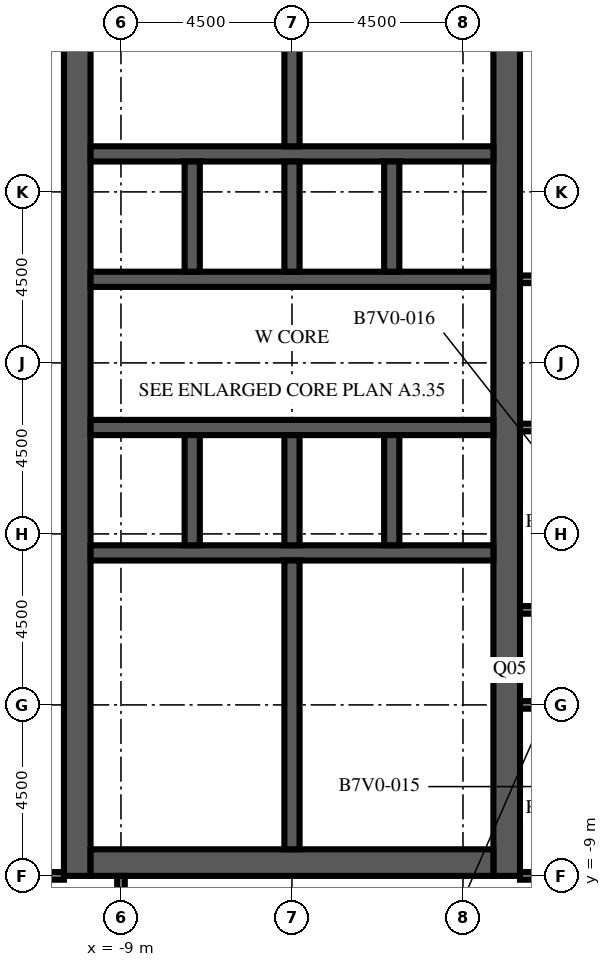
"""IFC4 building model, lengths in metres.
Left out: names, types, materials, properties, quantities, classifications, styles, units other than length and angle.
Written with IfcOpenShell. Run it as: python <this file> out.ifc"""

import sys

from ifc_helpers import new_model, si_unit, direction, frame, frame_2d, origin, place, context, subcontext, project, spatial, rectangle, extrude, element, fill, save


model = new_model("IFC4")
c1 = context("Model", 3, precision=1e-05, world=origin(), true_north=direction((0.0, 1.0)))
c2 = subcontext(c1, "Body", "Model", "MODEL_VIEW")
j1 = project(units=[si_unit("LENGTHUNIT", "METRE"), si_unit("PLANEANGLEUNIT", "RADIAN")], contexts=[c1])
p1 = place(None, origin())
s1 = spatial("IfcSite", under=j1, at=p1, CompositionType="ELEMENT")
p2 = place(p1, origin())
s2 = spatial("IfcBuilding", under=s1, at=p2, CompositionType="ELEMENT")
p3 = place(p2, frame((0.0, 0.0, 235.7)))
s3 = spatial("IfcBuildingStorey", under=s2, at=p3, CompositionType="ELEMENT", Elevation=235.7)
p4 = place(p3, frame((-10.15, -9.0, 0.0), z_axis=(0.0, 0.0, 1.0), x_axis=(0.0, 1.0, 0.0)))
e1 = element("IfcWall", 1, at=p4, inside=s3, PredefinedType="SHEAR", context=c2, shape_type="SweptSolid", body=[
    extrude(rectangle(XDim=27.5, YDim=0.7, at=frame_2d((13.75, 0.0))), origin(), (0.0, 0.0, 1.0), 4.1),
])
p5 = place(p4, frame((12.55, 0.0, 0.0)))
e2 = element("IfcOpeningElement", 2, at=p5, cuts=e1, PredefinedType="OPENING", context=c2, shape_type="SweptSolid", body=[
    extrude(rectangle(XDim=2.4, YDim=2.4, at=frame_2d((1.2, 1.2))), frame((0.0, 0.36, 0.0), z_axis=(0.0, -1.0, 0.0), x_axis=(1.0, 0.0, 0.0)), (0.0, 0.0, 1.0), 0.72),
])
p6 = place(p4, frame((6.825, 0.0, 0.0)))
e3 = element("IfcOpeningElement", 3, at=p6, cuts=e1, PredefinedType="OPENING", context=c2, shape_type="SweptSolid", body=[
    extrude(rectangle(XDim=1.2, YDim=2.1, at=frame_2d((0.6, 1.05))), frame((0.0, 0.36, 0.0), z_axis=(0.0, -1.0, 0.0), x_axis=(1.0, 0.0, 0.0)), (0.0, 0.0, 1.0), 0.72),
])
p7 = place(p4, frame((19.475, 0.0, 0.0)))
e4 = element("IfcOpeningElement", 4, at=p7, cuts=e1, PredefinedType="OPENING", context=c2, shape_type="SweptSolid", body=[
    extrude(rectangle(XDim=1.2, YDim=2.1, at=frame_2d((0.6, 1.05))), frame((0.0, 0.36, 0.0), z_axis=(0.0, -1.0, 0.0), x_axis=(1.0, 0.0, 0.0)), (0.0, 0.0, 1.0), 0.72),
])
p8 = place(p3, frame((1.15, -9.0, 0.0), z_axis=(0.0, 0.0, 1.0), x_axis=(0.0, 1.0, 0.0)))
e5 = element("IfcWall", 5, at=p8, inside=s3, PredefinedType="SHEAR", context=c2, shape_type="SweptSolid", body=[
    extrude(rectangle(XDim=27.5, YDim=0.7, at=frame_2d((13.75, 0.0))), origin(), (0.0, 0.0, 1.0), 4.1),
])
p9 = place(p8, frame((12.55, 0.0, 0.0)))
e6 = element("IfcOpeningElement", 6, at=p9, cuts=e5, PredefinedType="OPENING", context=c2, shape_type="SweptSolid", body=[
    extrude(rectangle(XDim=2.4, YDim=2.4, at=frame_2d((1.2, 1.2))), frame((0.0, 0.36, 0.0), z_axis=(0.0, -1.0, 0.0), x_axis=(1.0, 0.0, 0.0)), (0.0, 0.0, 1.0), 0.72),
])
p10 = place(p8, frame((5.42, 0.0, 0.0)))
e7 = element("IfcOpeningElement", 7, at=p10, cuts=e5, PredefinedType="OPENING", context=c2, shape_type="SweptSolid", body=[
    extrude(rectangle(XDim=1.2, YDim=2.1, at=frame_2d((0.6, 1.05))), frame((0.0, 0.36, 0.0), z_axis=(0.0, -1.0, 0.0), x_axis=(1.0, 0.0, 0.0)), (0.0, 0.0, 1.0), 0.72),
])
p11 = place(p8, frame((19.46, 0.0, 0.0)))
e8 = element("IfcOpeningElement", 8, at=p11, cuts=e5, PredefinedType="OPENING", context=c2, shape_type="SweptSolid", body=[
    extrude(rectangle(XDim=1.0, YDim=2.1, at=frame_2d((0.5, 1.05))), frame((0.0, 0.36, 0.0), z_axis=(0.0, -1.0, 0.0), x_axis=(1.0, 0.0, 0.0)), (0.0, 0.0, 1.0), 0.72),
])
p12 = place(p8, frame((21.17, 0.0, 0.0)))
e9 = element("IfcOpeningElement", 9, at=p12, cuts=e5, PredefinedType="OPENING", context=c2, shape_type="SweptSolid", body=[
    extrude(rectangle(XDim=1.0, YDim=2.1, at=frame_2d((0.5, 1.05))), frame((0.0, 0.36, 0.0), z_axis=(0.0, -1.0, 0.0), x_axis=(1.0, 0.0, 0.0)), (0.0, 0.0, 1.0), 0.72),
])
p13 = place(p8, frame((23.26, 0.0, 0.0)))
e10 = element("IfcOpeningElement", 10, at=p13, cuts=e5, PredefinedType="OPENING", context=c2, shape_type="SweptSolid", body=[
    extrude(rectangle(XDim=1.0, YDim=2.1, at=frame_2d((0.5, 1.05))), frame((0.0, 0.36, 0.0), z_axis=(0.0, -1.0, 0.0), x_axis=(1.0, 0.0, 0.0)), (0.0, 0.0, 1.0), 0.72),
])
p14 = place(p8, frame((25.35, 0.0, 0.0)))
e11 = element("IfcOpeningElement", 11, at=p14, cuts=e5, PredefinedType="OPENING", context=c2, shape_type="SweptSolid", body=[
    extrude(rectangle(XDim=1.0, YDim=2.1, at=frame_2d((0.5, 1.05))), frame((0.0, 0.36, 0.0), z_axis=(0.0, -1.0, 0.0), x_axis=(1.0, 0.0, 0.0)), (0.0, 0.0, 1.0), 0.72),
])
p15 = place(p3, frame((-9.8, -8.65, 0.0), z_axis=(0.0, 0.0, 1.0), x_axis=(1.0, 0.0, 0.0)))
e12 = element("IfcWall", 12, at=p15, inside=s3, PredefinedType="SHEAR", context=c2, shape_type="SweptSolid", body=[
    extrude(rectangle(XDim=10.6, YDim=0.7, at=frame_2d((5.3, 0.0))), origin(), (0.0, 0.0, 1.0), 4.1),
])
p16 = place(p3, frame((-9.8, -0.5, 0.0), z_axis=(0.0, 0.0, 1.0), x_axis=(1.0, 0.0, 0.0)))
e13 = element("IfcWall", 13, at=p16, inside=s3, PredefinedType="SHEAR", context=c2, shape_type="SweptSolid", body=[
    extrude(rectangle(XDim=10.6, YDim=0.4, at=frame_2d((5.3, 0.0))), origin(), (0.0, 0.0, 1.0), 4.1),
])
p17 = place(p3, frame((-9.8, 2.8, 0.0), z_axis=(0.0, 0.0, 1.0), x_axis=(1.0, 0.0, 0.0)))
e14 = element("IfcWall", 14, at=p17, inside=s3, PredefinedType="SHEAR", context=c2, shape_type="SweptSolid", body=[
    extrude(rectangle(XDim=10.6, YDim=0.4, at=frame_2d((5.3, 0.0))), origin(), (0.0, 0.0, 1.0), 4.1),
])
p18 = place(p17, frame((0.688, 0.0, 0.0)))
e15 = element("IfcOpeningElement", 15, at=p18, cuts=e14, PredefinedType="OPENING", context=c2, shape_type="SweptSolid", body=[
    extrude(rectangle(XDim=1.1, YDim=2.1, at=frame_2d((0.55, 1.05))), frame((0.0, 0.21, 0.0), z_axis=(0.0, -1.0, 0.0), x_axis=(1.0, 0.0, 0.0)), (0.0, 0.0, 1.0), 0.42),
])
p19 = place(p17, frame((3.438, 0.0, 0.0)))
e16 = element("IfcOpeningElement", 16, at=p19, cuts=e14, PredefinedType="OPENING", context=c2, shape_type="SweptSolid", body=[
    extrude(rectangle(XDim=1.1, YDim=2.1, at=frame_2d((0.55, 1.05))), frame((0.0, 0.21, 0.0), z_axis=(0.0, -1.0, 0.0), x_axis=(1.0, 0.0, 0.0)), (0.0, 0.0, 1.0), 0.42),
])
p20 = place(p17, frame((6.113, 0.0, 0.0)))
e17 = element("IfcOpeningElement", 17, at=p20, cuts=e14, PredefinedType="OPENING", context=c2, shape_type="SweptSolid", body=[
    extrude(rectangle(XDim=1.0, YDim=2.1, at=frame_2d((0.5, 1.05))), frame((0.0, 0.21, 0.0), z_axis=(0.0, -1.0, 0.0), x_axis=(1.0, 0.0, 0.0)), (0.0, 0.0, 1.0), 0.42),
])
p21 = place(p17, frame((8.863, 0.0, 0.0)))
e18 = element("IfcOpeningElement", 18, at=p21, cuts=e14, PredefinedType="OPENING", context=c2, shape_type="SweptSolid", body=[
    extrude(rectangle(XDim=1.0, YDim=2.1, at=frame_2d((0.5, 1.05))), frame((0.0, 0.21, 0.0), z_axis=(0.0, -1.0, 0.0), x_axis=(1.0, 0.0, 0.0)), (0.0, 0.0, 1.0), 0.42),
])
p22 = place(p3, frame((-9.8, 6.7, 0.0), z_axis=(0.0, 0.0, 1.0), x_axis=(1.0, 0.0, 0.0)))
e19 = element("IfcWall", 19, at=p22, inside=s3, PredefinedType="SHEAR", context=c2, shape_type="SweptSolid", body=[
    extrude(rectangle(XDim=10.6, YDim=0.4, at=frame_2d((5.3, 0.0))), origin(), (0.0, 0.0, 1.0), 4.1),
])
p23 = place(p22, frame((3.438, 0.0, 0.0)))
e20 = element("IfcOpeningElement", 20, at=p23, cuts=e19, PredefinedType="OPENING", context=c2, shape_type="SweptSolid", body=[
    extrude(rectangle(XDim=1.1, YDim=2.1, at=frame_2d((0.55, 1.05))), frame((0.0, 0.21, 0.0), z_axis=(0.0, -1.0, 0.0), x_axis=(1.0, 0.0, 0.0)), (0.0, 0.0, 1.0), 0.42),
])
p24 = place(p22, frame((6.062, 0.0, 0.0)))
e21 = element("IfcOpeningElement", 21, at=p24, cuts=e19, PredefinedType="OPENING", context=c2, shape_type="SweptSolid", body=[
    extrude(rectangle(XDim=1.1, YDim=2.1, at=frame_2d((0.55, 1.05))), frame((0.0, 0.21, 0.0), z_axis=(0.0, -1.0, 0.0), x_axis=(1.0, 0.0, 0.0)), (0.0, 0.0, 1.0), 0.42),
])
p25 = place(p22, frame((8.812, 0.0, 0.0)))
e22 = element("IfcOpeningElement", 22, at=p25, cuts=e19, PredefinedType="OPENING", context=c2, shape_type="SweptSolid", body=[
    extrude(rectangle(XDim=1.1, YDim=2.1, at=frame_2d((0.55, 1.05))), frame((0.0, 0.21, 0.0), z_axis=(0.0, -1.0, 0.0), x_axis=(1.0, 0.0, 0.0)), (0.0, 0.0, 1.0), 0.42),
])
p26 = place(p22, frame((0.738, 0.0, 0.0)))
e23 = element("IfcOpeningElement", 23, at=p26, cuts=e19, PredefinedType="OPENING", context=c2, shape_type="SweptSolid", body=[
    extrude(rectangle(XDim=1.0, YDim=2.1, at=frame_2d((0.5, 1.05))), frame((0.0, 0.21, 0.0), z_axis=(0.0, -1.0, 0.0), x_axis=(1.0, 0.0, 0.0)), (0.0, 0.0, 1.0), 0.42),
])
p27 = place(p3, frame((-9.8, 10.0, 0.0), z_axis=(0.0, 0.0, 1.0), x_axis=(1.0, 0.0, 0.0)))
e24 = element("IfcWall", 24, at=p27, inside=s3, PredefinedType="SHEAR", context=c2, shape_type="SweptSolid", body=[
    extrude(rectangle(XDim=10.6, YDim=0.4, at=frame_2d((5.3, 0.0))), origin(), (0.0, 0.0, 1.0), 4.1),
])
for number, where, z_axis, x_axis in (
    (25, (-7.125, -0.3, 0.0), (0.0, 0.0, 1.0), (0.0, 1.0, 0.0)),
    (26, (-7.125, 6.9, 0.0), (0.0, 0.0, 1.0), (0.0, 1.0, 0.0)),
    (27, (-4.5, -0.3, 0.0), (0.0, 0.0, 1.0), (0.0, 1.0, 0.0)),
    (28, (-4.5, 6.9, 0.0), (0.0, 0.0, 1.0), (0.0, 1.0, 0.0)),
    (29, (-1.875, -0.3, 0.0), (0.0, 0.0, 1.0), (0.0, 1.0, 0.0)),
    (30, (-1.875, 6.9, 0.0), (0.0, 0.0, 1.0), (0.0, 1.0, 0.0)),
):
    element("IfcWall", number, at=place(p3, frame(where, z_axis=z_axis, x_axis=x_axis)), inside=s3, PredefinedType="SHEAR", context=c2, shape_type="SweptSolid", body=[
        extrude(rectangle(XDim=2.9, YDim=0.4, at=frame_2d((1.45, 0.0))), origin(), (0.0, 0.0, 1.0), 4.1),
    ])
for number, where, z_axis, x_axis in (
    (31, (-4.5, -8.3, 0.0), (0.0, 0.0, 1.0), (0.0, 1.0, 0.0)),
    (32, (-4.5, 10.2, 0.0), (0.0, 0.0, 1.0), (0.0, 1.0, 0.0)),
):
    element("IfcWall", number, at=place(p3, frame(where, z_axis=z_axis, x_axis=x_axis)), inside=s3, PredefinedType="SHEAR", context=c2, shape_type="SweptSolid", body=[
        extrude(rectangle(XDim=7.6, YDim=0.4, at=frame_2d((3.8, 0.0))), origin(), (0.0, 0.0, 1.0), 4.1),
    ])
p28 = place(p3, frame((-0.7, -5.26, 0.0), z_axis=(0.0, 0.0, 1.0), x_axis=(1.0, 0.0, 0.0)))
e33 = element("IfcWall", 33, at=p28, inside=s3, PredefinedType="PARTITIONING", context=c2, shape_type="SweptSolid", body=[
    extrude(rectangle(XDim=1.5, YDim=0.1, at=frame_2d((0.75, 0.0))), origin(), (0.0, 0.0, 1.0), 3.65),
])
p29 = place(p28, frame((0.25, 0.0, 0.0)))
e34 = element("IfcOpeningElement", 34, at=p29, cuts=e33, PredefinedType="OPENING", context=c2, shape_type="SweptSolid", body=[
    extrude(rectangle(XDim=1.0, YDim=2.1, at=frame_2d((0.5, 1.05))), frame((0.0, 0.06, 0.0), z_axis=(0.0, -1.0, 0.0), x_axis=(1.0, 0.0, 0.0)), (0.0, 0.0, 1.0), 0.12),
])
p30 = place(p3, frame((-0.7, -5.26, 0.0), z_axis=(0.0, 0.0, 1.0), x_axis=(0.0, 1.0, 0.0)))
e35 = element("IfcWall", 35, at=p30, inside=s3, PredefinedType="PARTITIONING", context=c2, shape_type="SweptSolid", body=[
    extrude(rectangle(XDim=2.28, YDim=0.1, at=frame_2d((1.14, 0.0))), origin(), (0.0, 0.0, 1.0), 3.65),
])
p31 = place(p30, frame((0.64, 0.0, 0.0)))
e36 = element("IfcOpeningElement", 36, at=p31, cuts=e35, PredefinedType="OPENING", context=c2, shape_type="SweptSolid", body=[
    extrude(rectangle(XDim=1.0, YDim=2.1, at=frame_2d((0.5, 1.05))), frame((0.0, 0.06, 0.0), z_axis=(0.0, -1.0, 0.0), x_axis=(1.0, 0.0, 0.0)), (0.0, 0.0, 1.0), 0.12),
])
p32 = place(p3, frame((-0.7, -2.98, 0.0), z_axis=(0.0, 0.0, 1.0), x_axis=(0.0, 1.0, 0.0)))
e37 = element("IfcWall", 37, at=p32, inside=s3, PredefinedType="PARTITIONING", context=c2, shape_type="SweptSolid", body=[
    extrude(rectangle(XDim=2.28, YDim=0.1, at=frame_2d((1.14, 0.0))), origin(), (0.0, 0.0, 1.0), 3.65),
])
p33 = place(p32, frame((0.64, 0.0, 0.0)))
e38 = element("IfcOpeningElement", 38, at=p33, cuts=e37, PredefinedType="OPENING", context=c2, shape_type="SweptSolid", body=[
    extrude(rectangle(XDim=1.0, YDim=2.1, at=frame_2d((0.5, 1.05))), frame((0.0, 0.06, 0.0), z_axis=(0.0, -1.0, 0.0), x_axis=(1.0, 0.0, 0.0)), (0.0, 0.0, 1.0), 0.12),
])
for number, where, z_axis, x_axis in (
    (39, (-4.3, -5.26, 0.0), (0.0, 0.0, 1.0), (1.0, 0.0, 0.0)),
    (40, (-4.3, -2.98, 0.0), (0.0, 0.0, 1.0), (1.0, 0.0, 0.0)),
):
    element("IfcWall", number, at=place(p3, frame(where, z_axis=z_axis, x_axis=x_axis)), inside=s3, PredefinedType="PARTITIONING", context=c2, shape_type="SweptSolid", body=[
        extrude(rectangle(XDim=3.6, YDim=0.1, at=frame_2d((1.8, 0.0))), origin(), (0.0, 0.0, 1.0), 3.65),
    ])
p34 = place(p3, frame((-4.3, 11.72, 0.0), z_axis=(0.0, 0.0, 1.0), x_axis=(1.0, 0.0, 0.0)))
e41 = element("IfcWall", 41, at=p34, inside=s3, PredefinedType="PARTITIONING", context=c2, shape_type="SweptSolid", body=[
    extrude(rectangle(XDim=5.1, YDim=0.1, at=frame_2d((2.55, 0.0))), origin(), (0.0, 0.0, 1.0), 3.65),
])
p35 = place(p3, frame((-9.0, -17.5, 0.0), z_axis=(0.0, 0.0, 1.0), x_axis=(0.0, 1.0, 0.0)))
e42 = element("IfcWall", 42, at=p35, inside=s3, PredefinedType="PARTITIONING", context=c2, shape_type="SweptSolid", body=[
    extrude(rectangle(XDim=8.5, YDim=0.2, at=frame_2d((4.25, 0.0))), origin(), (0.0, 0.0, 1.0), 3.65),
])
p36 = place(p3, frame((-10.5, -9.0, 0.0), z_axis=(0.0, 0.0, 1.0), x_axis=(-1.0, 0.0, 0.0)))
e43 = element("IfcWall", 43, at=p36, inside=s3, PredefinedType="PARTITIONING", context=c2, shape_type="SweptSolid", body=[
    extrude(rectangle(XDim=3.0, YDim=0.2, at=frame_2d((1.5, 0.0))), origin(), (0.0, 0.0, 1.0), 3.65),
])
p37 = place(p36, frame((0.9, 0.0, 0.0)))
e44 = element("IfcOpeningElement", 44, at=p37, cuts=e43, PredefinedType="OPENING", context=c2, shape_type="SweptSolid", body=[
    extrude(rectangle(XDim=1.0, YDim=2.1, at=frame_2d((0.5, 1.05))), frame((0.0, 0.11, 0.0), z_axis=(0.0, -1.0, 0.0), x_axis=(1.0, 0.0, 0.0)), (0.0, 0.0, 1.0), 0.22),
])
p38 = place(p3, frame((6.0, -9.0, 0.0), z_axis=(0.0, 0.0, 1.0), x_axis=(-1.0, 0.0, 0.0)))
e45 = element("IfcWall", 45, at=p38, inside=s3, PredefinedType="PARTITIONING", context=c2, shape_type="SweptSolid", body=[
    extrude(rectangle(XDim=4.5, YDim=0.2, at=frame_2d((2.25, 0.0))), origin(), (0.0, 0.0, 1.0), 3.65),
])
p39 = place(p38, frame((1.9, 0.0, 0.0)))
e46 = element("IfcOpeningElement", 46, at=p39, cuts=e45, PredefinedType="OPENING", context=c2, shape_type="SweptSolid", body=[
    extrude(rectangle(XDim=1.0, YDim=2.1, at=frame_2d((0.5, 1.05))), frame((0.0, 0.11, 0.0), z_axis=(0.0, -1.0, 0.0), x_axis=(1.0, 0.0, 0.0)), (0.0, 0.0, 1.0), 0.22),
])
p40 = place(p38, frame((0.15, 0.0, 0.0)))
e47 = element("IfcOpeningElement", 47, at=p40, cuts=e45, PredefinedType="OPENING", context=c2, shape_type="SweptSolid", body=[
    extrude(rectangle(XDim=1.0, YDim=2.1, at=frame_2d((0.5, 1.05))), frame((0.0, 0.11, 0.0), z_axis=(0.0, -1.0, 0.0), x_axis=(1.0, 0.0, 0.0)), (0.0, 0.0, 1.0), 0.22),
])
for number, where, z_axis, x_axis in (
    (48, (1.5, -4.5, 0.0), (0.0, 0.0, 1.0), (1.0, 0.0, 0.0)),
    (49, (1.5, -2.0, 0.0), (0.0, 0.0, 1.0), (1.0, 0.0, 0.0)),
    (50, (1.5, 2.8, 0.0), (0.0, 0.0, 1.0), (1.0, 0.0, 0.0)),
    (51, (1.5, 6.7, 0.0), (0.0, 0.0, 1.0), (1.0, 0.0, 0.0)),
):
    element("IfcWall", number, at=place(p3, frame(where, z_axis=z_axis, x_axis=x_axis)), inside=s3, PredefinedType="PARTITIONING", context=c2, shape_type="SweptSolid", body=[
        extrude(rectangle(XDim=1.5, YDim=0.2, at=frame_2d((0.75, 0.0))), origin(), (0.0, 0.0, 1.0), 3.65),
    ])
p41 = place(p18, origin())
e52 = element("IfcDoor", 52, at=p41, inside=s3, OperationType="DOUBLE_DOOR_SLIDING", PredefinedType="DOOR", context=c2, shape_type="SweptSolid", body=[
    extrude(rectangle(XDim=1.1, YDim=2.1, at=frame_2d((0.55, 1.05))), frame((0.0, 0.025, 0.0), z_axis=(0.0, -1.0, 0.0), x_axis=(1.0, 0.0, 0.0)), (0.0, 0.0, 1.0), 0.05),
])
fill(e15, e52)
p42 = place(p19, origin())
e53 = element("IfcDoor", 53, at=p42, inside=s3, OperationType="DOUBLE_DOOR_SLIDING", PredefinedType="DOOR", context=c2, shape_type="SweptSolid", body=[
    extrude(rectangle(XDim=1.1, YDim=2.1, at=frame_2d((0.55, 1.05))), frame((0.0, 0.025, 0.0), z_axis=(0.0, -1.0, 0.0), x_axis=(1.0, 0.0, 0.0)), (0.0, 0.0, 1.0), 0.05),
])
fill(e16, e53)
p43 = place(p23, origin())
e54 = element("IfcDoor", 54, at=p43, inside=s3, OperationType="DOUBLE_DOOR_SLIDING", PredefinedType="DOOR", context=c2, shape_type="SweptSolid", body=[
    extrude(rectangle(XDim=1.1, YDim=2.1, at=frame_2d((0.55, 1.05))), frame((0.0, 0.025, 0.0), z_axis=(0.0, -1.0, 0.0), x_axis=(1.0, 0.0, 0.0)), (0.0, 0.0, 1.0), 0.05),
])
fill(e20, e54)
p44 = place(p24, origin())
e55 = element("IfcDoor", 55, at=p44, inside=s3, OperationType="DOUBLE_DOOR_SLIDING", PredefinedType="DOOR", context=c2, shape_type="SweptSolid", body=[
    extrude(rectangle(XDim=1.1, YDim=2.1, at=frame_2d((0.55, 1.05))), frame((0.0, 0.025, 0.0), z_axis=(0.0, -1.0, 0.0), x_axis=(1.0, 0.0, 0.0)), (0.0, 0.0, 1.0), 0.05),
])
fill(e21, e55)
p45 = place(p25, origin())
e56 = element("IfcDoor", 56, at=p45, inside=s3, OperationType="DOUBLE_DOOR_SLIDING", PredefinedType="DOOR", context=c2, shape_type="SweptSolid", body=[
    extrude(rectangle(XDim=1.1, YDim=2.1, at=frame_2d((0.55, 1.05))), frame((0.0, 0.025, 0.0), z_axis=(0.0, -1.0, 0.0), x_axis=(1.0, 0.0, 0.0)), (0.0, 0.0, 1.0), 0.05),
])
fill(e22, e56)
p46 = place(p5, origin())
e57 = element("IfcDoor", 57, at=p46, inside=s3, OperationType="DOUBLE_DOOR_DOUBLE_SWING", PredefinedType="DOOR", context=c2, shape_type="SweptSolid", body=[
    extrude(rectangle(XDim=2.4, YDim=2.4, at=frame_2d((1.2, 1.2))), frame((0.0, 0.025, 0.0), z_axis=(0.0, -1.0, 0.0), x_axis=(1.0, 0.0, 0.0)), (0.0, 0.0, 1.0), 0.05),
])
fill(e2, e57)
p47 = place(p9, origin())
e58 = element("IfcDoor", 58, at=p47, inside=s3, OperationType="DOUBLE_DOOR_DOUBLE_SWING", PredefinedType="DOOR", context=c2, shape_type="SweptSolid", body=[
    extrude(rectangle(XDim=2.4, YDim=2.4, at=frame_2d((1.2, 1.2))), frame((0.0, 0.025, 0.0), z_axis=(0.0, -1.0, 0.0), x_axis=(1.0, 0.0, 0.0)), (0.0, 0.0, 1.0), 0.05),
])
fill(e6, e58)
p48 = place(p6, origin())
e59 = element("IfcDoor", 59, at=p48, inside=s3, OperationType="SINGLE_SWING_LEFT", PredefinedType="DOOR", context=c2, shape_type="SweptSolid", body=[
    extrude(rectangle(XDim=1.2, YDim=2.1, at=frame_2d((0.6, 1.05))), frame((0.0, 0.025, 0.0), z_axis=(0.0, -1.0, 0.0), x_axis=(1.0, 0.0, 0.0)), (0.0, 0.0, 1.0), 0.05),
])
fill(e3, e59)
p49 = place(p7, origin())
e60 = element("IfcDoor", 60, at=p49, inside=s3, OperationType="SINGLE_SWING_LEFT", PredefinedType="DOOR", context=c2, shape_type="SweptSolid", body=[
    extrude(rectangle(XDim=1.2, YDim=2.1, at=frame_2d((0.6, 1.05))), frame((0.0, 0.025, 0.0), z_axis=(0.0, -1.0, 0.0), x_axis=(1.0, 0.0, 0.0)), (0.0, 0.0, 1.0), 0.05),
])
fill(e4, e60)
p50 = place(p20, origin())
e61 = element("IfcDoor", 61, at=p50, inside=s3, OperationType="SINGLE_SWING_LEFT", PredefinedType="DOOR", context=c2, shape_type="SweptSolid", body=[
    extrude(rectangle(XDim=1.0, YDim=2.1, at=frame_2d((0.5, 1.05))), frame((0.0, 0.025, 0.0), z_axis=(0.0, -1.0, 0.0), x_axis=(1.0, 0.0, 0.0)), (0.0, 0.0, 1.0), 0.05),
])
fill(e17, e61)
p51 = place(p21, origin())
e62 = element("IfcDoor", 62, at=p51, inside=s3, OperationType="SINGLE_SWING_RIGHT", PredefinedType="DOOR", context=c2, shape_type="SweptSolid", body=[
    extrude(rectangle(XDim=1.0, YDim=2.1, at=frame_2d((0.5, 1.05))), frame((0.0, 0.025, 0.0), z_axis=(0.0, -1.0, 0.0), x_axis=(1.0, 0.0, 0.0)), (0.0, 0.0, 1.0), 0.05),
])
fill(e18, e62)
p52 = place(p26, origin())
e63 = element("IfcDoor", 63, at=p52, inside=s3, OperationType="SINGLE_SWING_LEFT", PredefinedType="DOOR", context=c2, shape_type="SweptSolid", body=[
    extrude(rectangle(XDim=1.0, YDim=2.1, at=frame_2d((0.5, 1.05))), frame((0.0, 0.025, 0.0), z_axis=(0.0, -1.0, 0.0), x_axis=(1.0, 0.0, 0.0)), (0.0, 0.0, 1.0), 0.05),
])
fill(e23, e63)
p53 = place(p10, origin())
e64 = element("IfcDoor", 64, at=p53, inside=s3, OperationType="SINGLE_SWING_LEFT", PredefinedType="DOOR", context=c2, shape_type="SweptSolid", body=[
    extrude(rectangle(XDim=1.2, YDim=2.1, at=frame_2d((0.6, 1.05))), frame((0.0, 0.325, 0.0), z_axis=(0.0, -1.0, 0.0), x_axis=(1.0, 0.0, 0.0)), (0.0, 0.0, 1.0), 0.05),
])
fill(e7, e64)
p54 = place(p29, origin())
e65 = element("IfcDoor", 65, at=p54, inside=s3, OperationType="SINGLE_SWING_RIGHT", PredefinedType="DOOR", context=c2, shape_type="SweptSolid", body=[
    extrude(rectangle(XDim=1.0, YDim=2.1, at=frame_2d((0.5, 1.05))), frame((0.0, 0.025, 0.0), z_axis=(0.0, -1.0, 0.0), x_axis=(1.0, 0.0, 0.0)), (0.0, 0.0, 1.0), 0.05),
])
fill(e34, e65)
p55 = place(p31, origin())
e66 = element("IfcDoor", 66, at=p55, inside=s3, OperationType="SINGLE_SWING_LEFT", PredefinedType="DOOR", context=c2, shape_type="SweptSolid", body=[
    extrude(rectangle(XDim=1.0, YDim=2.1, at=frame_2d((0.5, 1.05))), frame((0.0, 0.025, 0.0), z_axis=(0.0, -1.0, 0.0), x_axis=(1.0, 0.0, 0.0)), (0.0, 0.0, 1.0), 0.05),
])
fill(e36, e66)
p56 = place(p33, origin())
e67 = element("IfcDoor", 67, at=p56, inside=s3, OperationType="SINGLE_SWING_RIGHT", PredefinedType="DOOR", context=c2, shape_type="SweptSolid", body=[
    extrude(rectangle(XDim=1.0, YDim=2.1, at=frame_2d((0.5, 1.05))), frame((0.0, 0.025, 0.0), z_axis=(0.0, -1.0, 0.0), x_axis=(1.0, 0.0, 0.0)), (0.0, 0.0, 1.0), 0.05),
])
fill(e38, e67)
p57 = place(p11, origin())
e68 = element("IfcDoor", 68, at=p57, inside=s3, OperationType="SINGLE_SWING_LEFT", PredefinedType="DOOR", context=c2, shape_type="SweptSolid", body=[
    extrude(rectangle(XDim=1.0, YDim=2.1, at=frame_2d((0.5, 1.05))), frame((0.0, 0.325, 0.0), z_axis=(0.0, -1.0, 0.0), x_axis=(1.0, 0.0, 0.0)), (0.0, 0.0, 1.0), 0.05),
])
fill(e8, e68)
p58 = place(p12, origin())
e69 = element("IfcDoor", 69, at=p58, inside=s3, OperationType="SINGLE_SWING_RIGHT", PredefinedType="DOOR", context=c2, shape_type="SweptSolid", body=[
    extrude(rectangle(XDim=1.0, YDim=2.1, at=frame_2d((0.5, 1.05))), frame((0.0, 0.325, 0.0), z_axis=(0.0, -1.0, 0.0), x_axis=(1.0, 0.0, 0.0)), (0.0, 0.0, 1.0), 0.05),
])
fill(e9, e69)
save(model, sys.argv[1])
